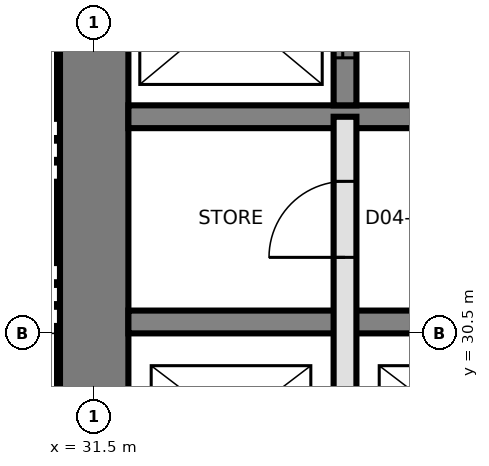
"""IFC4 building model, lengths in metres.
Left out: names, types, materials, properties, quantities, classifications, styles, units other than length and angle.
Written with IfcOpenShell. Run it as: python <this file> out.ifc"""

import sys

from ifc_helpers import new_model, si_unit, direction, frame, frame_2d, origin, place, context, subcontext, project, spatial, rectangle, extrude, element, fill, save


model = new_model("IFC4")
c1 = context("Model", 3, precision=1e-05, world=origin(), true_north=direction((0.0, 1.0)))
c2 = subcontext(c1, "Body", "Model", "MODEL_VIEW")
j1 = project(units=[si_unit("LENGTHUNIT", "METRE"), si_unit("PLANEANGLEUNIT", "RADIAN")], contexts=[c1])
p1 = place(None, origin())
s1 = spatial("IfcSite", under=j1, at=p1, CompositionType="ELEMENT")
p2 = place(p1, origin())
s2 = spatial("IfcBuilding", under=s1, at=p2, CompositionType="ELEMENT")
p3 = place(p2, frame((0.0, 0.0, 63.1)))
s3 = spatial("IfcBuildingStorey", under=s2, at=p3, CompositionType="ELEMENT", Elevation=63.1)
p4 = place(p3, frame((31.5, 21.95, 0.0), z_axis=(0.0, 0.0, 1.0), x_axis=(0.0, 1.0, 0.0)))
e1 = element("IfcWall", 1, at=p4, inside=s3, PredefinedType="SHEAR", context=c2, shape_type="SweptSolid", body=[
    extrude(rectangle(XDim=17.1, YDim=0.9, at=frame_2d((8.55, 0.0))), origin(), (0.0, 0.0, 1.0), 3.7),
])
p5 = place(p3, frame((31.95, 30.65, 0.0), z_axis=(0.0, 0.0, 1.0), x_axis=(1.0, 0.0, 0.0)))
e2 = element("IfcWall", 2, at=p5, inside=s3, PredefinedType="SHEAR", context=c2, shape_type="SweptSolid", body=[
    extrude(rectangle(XDim=26.1, YDim=0.3, at=frame_2d((13.05, 0.0))), origin(), (0.0, 0.0, 1.0), 3.7),
])
p6 = place(p5, frame((24.55, 0.0, 0.0)))
e3 = element("IfcOpeningElement", 3, at=p6, cuts=e2, PredefinedType="OPENING", context=c2, shape_type="SweptSolid", body=[
    extrude(rectangle(XDim=1.0, YDim=2.1, at=frame_2d((0.5, 1.05))), frame((0.0, 0.16, 0.0), z_axis=(0.0, -1.0, 0.0), x_axis=(1.0, 0.0, 0.0)), (0.0, 0.0, 1.0), 0.32),
])
p7 = place(p5, frame((11.35, 0.0, 0.0)))
e4 = element("IfcOpeningElement", 4, at=p7, cuts=e2, PredefinedType="OPENING", context=c2, shape_type="SweptSolid", body=[
    extrude(rectangle(XDim=1.0, YDim=2.1, at=frame_2d((0.5, 1.05))), frame((0.0, 0.16, 0.0), z_axis=(0.0, -1.0, 0.0), x_axis=(1.0, 0.0, 0.0)), (0.0, 0.0, 1.0), 0.32),
])
p8 = place(p3, frame((31.95, 33.35, 0.0), z_axis=(0.0, 0.0, 1.0), x_axis=(1.0, 0.0, 0.0)))
e5 = element("IfcWall", 5, at=p8, inside=s3, PredefinedType="SHEAR", context=c2, shape_type="SweptSolid", body=[
    extrude(rectangle(XDim=26.1, YDim=0.3, at=frame_2d((13.05, 0.0))), origin(), (0.0, 0.0, 1.0), 3.7),
])
p9 = place(p8, frame((13.7, 0.0, 0.0)))
e6 = element("IfcOpeningElement", 6, at=p9, cuts=e5, PredefinedType="OPENING", context=c2, shape_type="SweptSolid", body=[
    extrude(rectangle(XDim=1.4, YDim=2.1, at=frame_2d((0.7, 1.05))), frame((0.0, 0.16, 0.0), z_axis=(0.0, -1.0, 0.0), x_axis=(1.0, 0.0, 0.0)), (0.0, 0.0, 1.0), 0.32),
])
p10 = place(p8, frame((5.175, 0.0, 0.0)))
e7 = element("IfcOpeningElement", 7, at=p10, cuts=e5, PredefinedType="OPENING", context=c2, shape_type="SweptSolid", body=[
    extrude(rectangle(XDim=1.2, YDim=2.1, at=frame_2d((0.6, 1.05))), frame((0.0, 0.16, 0.0), z_axis=(0.0, -1.0, 0.0), x_axis=(1.0, 0.0, 0.0)), (0.0, 0.0, 1.0), 0.32),
])
p11 = place(p8, frame((19.725, 0.0, 0.0)))
e8 = element("IfcOpeningElement", 8, at=p11, cuts=e5, PredefinedType="OPENING", context=c2, shape_type="SweptSolid", body=[
    extrude(rectangle(XDim=1.2, YDim=2.1, at=frame_2d((0.6, 1.05))), frame((0.0, 0.16, 0.0), z_axis=(0.0, -1.0, 0.0), x_axis=(1.0, 0.0, 0.0)), (0.0, 0.0, 1.0), 0.32),
])
p12 = place(p3, frame((34.8, 33.5, 0.0), z_axis=(0.0, 0.0, 1.0), x_axis=(0.0, 1.0, 0.0)))
e9 = element("IfcWall", 9, at=p12, inside=s3, PredefinedType="SHEAR", context=c2, shape_type="SweptSolid", body=[
    extrude(rectangle(XDim=2.55, YDim=0.3, at=frame_2d((1.275, 0.0))), origin(), (0.0, 0.0, 1.0), 3.7),
])
p13 = place(p12, frame((0.625, 0.0, 0.0)))
e10 = element("IfcOpeningElement", 10, at=p13, cuts=e9, PredefinedType="OPENING", context=c2, shape_type="SweptSolid", body=[
    extrude(rectangle(XDim=1.3, YDim=2.4, at=frame_2d((0.65, 1.2))), frame((0.0, 0.16, 0.0), z_axis=(0.0, -1.0, 0.0), x_axis=(1.0, 0.0, 0.0)), (0.0, 0.0, 1.0), 0.32),
])
p14 = place(p3, frame((34.8, 27.9, 0.0), z_axis=(0.0, 0.0, 1.0), x_axis=(0.0, 1.0, 0.0)))
e11 = element("IfcWall", 11, at=p14, inside=s3, PredefinedType="SOLIDWALL", context=c2, shape_type="SweptSolid", body=[
    extrude(rectangle(XDim=5.45, YDim=0.3, at=frame_2d((2.725, 0.0))), origin(), (0.0, 0.0, 1.0), 3.4),
])
p15 = place(p14, frame((3.6, 0.0, 0.0)))
e12 = element("IfcOpeningElement", 12, at=p15, cuts=e11, PredefinedType="OPENING", context=c2, shape_type="SweptSolid", body=[
    extrude(rectangle(XDim=1.0, YDim=2.1, at=frame_2d((0.5, 1.05))), frame((0.0, 0.16, 0.0), z_axis=(0.0, -1.0, 0.0), x_axis=(1.0, 0.0, 0.0)), (0.0, 0.0, 1.0), 0.32),
])
p16 = place(p13, origin())
e13 = element("IfcDoor", 13, at=p16, inside=s3, OperationType="SLIDING_TO_LEFT", PredefinedType="DOOR", context=c2, shape_type="SweptSolid", body=[
    extrude(rectangle(XDim=1.3, YDim=2.4, at=frame_2d((0.65, 1.2))), frame((0.0, 0.025, 0.0), z_axis=(0.0, -1.0, 0.0), x_axis=(1.0, 0.0, 0.0)), (0.0, 0.0, 1.0), 0.05),
])
fill(e10, e13)
p17 = place(p15, origin())
e14 = element("IfcDoor", 14, at=p17, inside=s3, OperationType="SINGLE_SWING_LEFT", PredefinedType="DOOR", context=c2, shape_type="SweptSolid", body=[
    extrude(rectangle(XDim=1.0, YDim=2.1, at=frame_2d((0.5, 1.05))), frame((0.0, 0.025, 0.0), z_axis=(0.0, -1.0, 0.0), x_axis=(1.0, 0.0, 0.0)), (0.0, 0.0, 1.0), 0.05),
])
fill(e12, e14)
save(model, sys.argv[1])
